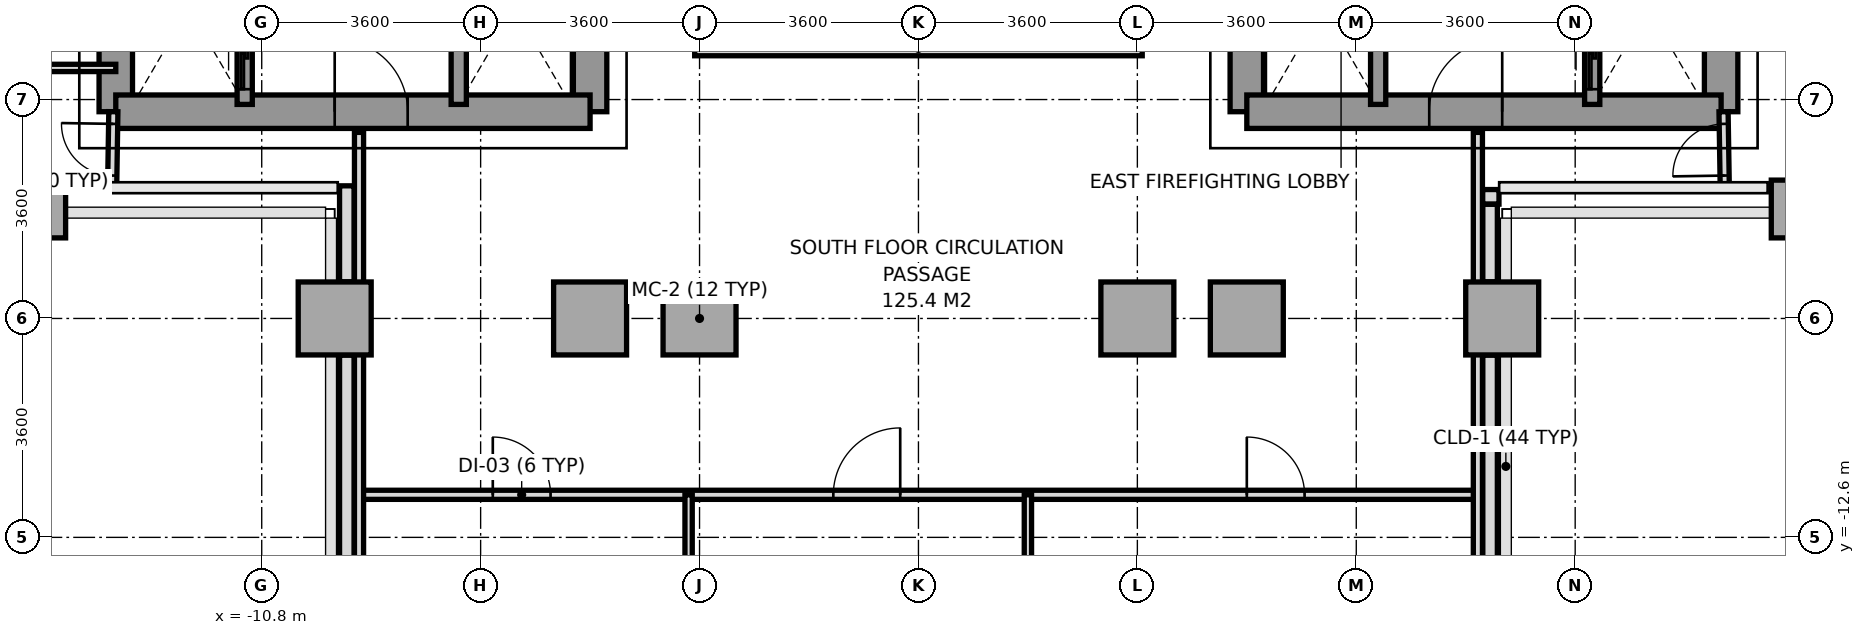
"""IFC4 building model, lengths in metres.
Left out: names, types, materials, properties, quantities, classifications, styles, units other than length and angle.
Written with IfcOpenShell. Run it as: python <this file> out.ifc"""

import sys

from ifc_helpers import new_model, si_unit, direction, frame, frame_2d, origin, origin_2d, place, context, subcontext, project, spatial, rectangle, extrude, source, transform, mapped, element, fill, save


model = new_model("IFC4")
c1 = context("Model", 3, precision=1e-05, world=origin(), true_north=direction((0.0, 1.0)))
c2 = subcontext(c1, "Body", "Model", "MODEL_VIEW")
j1 = project(units=[si_unit("LENGTHUNIT", "METRE"), si_unit("PLANEANGLEUNIT", "RADIAN")], contexts=[c1])
p1 = place(None, origin())
s1 = spatial("IfcSite", under=j1, at=p1, CompositionType="ELEMENT")
p2 = place(p1, origin())
s2 = spatial("IfcBuilding", under=s1, at=p2, CompositionType="ELEMENT")
p3 = place(p2, frame((0.0, 0.0, 51.0)))
s3 = spatial("IfcBuildingStorey", under=s2, at=p3, CompositionType="ELEMENT", Elevation=51.0)
m1 = source(origin(), c2, "Body", "SweptSolid", [
    extrude(rectangle(XDim=0.75, YDim=0.95, at=origin_2d()), origin(), (0.0, 0.0, 1.0), 3.2),
])
p4 = place(p3, frame((-14.4, -7.2, 0.0), z_axis=(0.0, 0.0, 1.0), x_axis=(1.0, 0.0, 0.0)))
e1 = element("IfcColumn", 1, at=p4, inside=s3, PredefinedType="COLUMN", context=c2, shape_type="MappedRepresentation", body=[
    mapped(m1, transform((0.0, 0.0, 0.0), x_axis=(1.0, 0.0, 0.0), y_axis=(0.0, 1.0, 0.0), z_axis=(0.0, 0.0, 1.0), scale=1.0)),
])
m2 = source(origin(), c2, "Body", "SweptSolid", [
    extrude(rectangle(XDim=1.2, YDim=1.2, at=origin_2d()), origin(), (0.0, 0.0, 1.0), 3.2),
])
for number, where, z_axis, x_axis in (
    (2, (-9.6, -9.0, 0.0), (0.0, 0.0, 1.0), (1.0, 0.0, 0.0)),
    (3, (-5.4, -9.0, 0.0), (0.0, 0.0, 1.0), (1.0, 0.0, 0.0)),
    (4, (-3.6, -9.0, 0.0), (0.0, 0.0, 1.0), (1.0, 0.0, 0.0)),
    (5, (3.6, -9.0, 0.0), (0.0, 0.0, 1.0), (1.0, 0.0, 0.0)),
    (6, (5.4, -9.0, 0.0), (0.0, 0.0, 1.0), (1.0, 0.0, 0.0)),
    (7, (9.6, -9.0, 0.0), (0.0, 0.0, 1.0), (1.0, 0.0, 0.0)),
):
    element("IfcColumn", number, at=place(p3, frame(where, z_axis=z_axis, x_axis=x_axis)), inside=s3, PredefinedType="COLUMN", context=c2, shape_type="MappedRepresentation", body=[
        mapped(m2, transform((0.0, 0.0, 0.0), x_axis=(1.0, 0.0, 0.0), y_axis=(0.0, 1.0, 0.0), z_axis=(0.0, 0.0, 1.0), scale=1.0)),
    ])
p5 = place(p3, frame((14.4, -7.2, 0.0), z_axis=(0.0, 0.0, 1.0), x_axis=(1.0, 0.0, 0.0)))
e8 = element("IfcColumn", 8, at=p5, inside=s3, PredefinedType="COLUMN", context=c2, shape_type="MappedRepresentation", body=[
    mapped(m1, transform((0.0, 0.0, 0.0), x_axis=(1.0, 0.0, 0.0), y_axis=(0.0, 1.0, 0.0), z_axis=(0.0, 0.0, 1.0), scale=1.0)),
])
p6 = place(p3, frame((9.547, -7.0, 0.0), z_axis=(0.0, 0.0, 1.0), x_axis=(-1.0, 0.0, 0.0)))
e9 = element("IfcWall", 9, at=p6, inside=s3, PredefinedType="PARAPET", context=c2, shape_type="SweptSolid", body=[
    extrude(rectangle(XDim=0.269, YDim=0.24, at=frame_2d((0.135, 0.0))), origin(), (0.0, 0.0, 1.0), 1.15),
])
p7 = place(p3, frame((9.4, -7.123, 0.0), z_axis=(0.0, 0.0, 1.0), x_axis=(0.0, -1.0, 0.0)))
e10 = element("IfcWall", 10, at=p7, inside=s3, PredefinedType="PARAPET", context=c2, shape_type="SweptSolid", body=[
    extrude(rectangle(XDim=1.274, YDim=0.24, at=frame_2d((0.637, 0.0))), origin(), (0.0, 0.0, 1.0), 1.15),
])
p8 = place(p3, frame((9.4, -9.603, 0.0), z_axis=(0.0, 0.0, 1.0), x_axis=(0.0, -1.0, 0.0)))
e11 = element("IfcWall", 11, at=p8, inside=s3, PredefinedType="PARAPET", context=c2, shape_type="SweptSolid", body=[
    extrude(rectangle(XDim=6.0, YDim=0.24, at=frame_2d((3.0, 0.0))), origin(), (0.0, 0.0, 1.0), 1.15),
])
p9 = place(p3, frame((-9.4, -15.358, 0.0), z_axis=(0.0, 0.0, 1.0), x_axis=(0.0, 1.0, 0.0)))
e12 = element("IfcWall", 12, at=p9, inside=s3, PredefinedType="PARAPET", context=c2, shape_type="SweptSolid", body=[
    extrude(rectangle(XDim=5.755, YDim=0.24, at=frame_2d((2.877, 0.0))), origin(), (0.0, 0.0, 1.0), 1.15),
])
p10 = place(p3, frame((-9.4, -8.397, 0.0), z_axis=(0.0, 0.0, 1.0), x_axis=(0.0, 1.0, 0.0)))
e13 = element("IfcWall", 13, at=p10, inside=s3, PredefinedType="PARAPET", context=c2, shape_type="SweptSolid", body=[
    extrude(rectangle(XDim=1.578, YDim=0.24, at=frame_2d((0.789, 0.0))), origin(), (0.0, 0.0, 1.0), 1.15),
])
p11 = place(p3, frame((-13.2, -5.6, 0.0), z_axis=(0.0, 0.0, 1.0), x_axis=(0.0, 1.0, 0.0)))
e14 = element("IfcWall", 14, at=p11, inside=s3, PredefinedType="SHEAR", context=c2, shape_type="SweptSolid", body=[
    extrude(rectangle(XDim=11.2, YDim=0.55, at=frame_2d((5.6, 0.0))), origin(), (0.0, 0.0, 1.0), 3.2),
])
p12 = place(p3, frame((-5.4, -5.6, 0.0), z_axis=(0.0, 0.0, 1.0), x_axis=(0.0, 1.0, 0.0)))
e15 = element("IfcWall", 15, at=p12, inside=s3, PredefinedType="SHEAR", context=c2, shape_type="SweptSolid", body=[
    extrude(rectangle(XDim=12.5, YDim=0.55, at=frame_2d((6.25, 0.0))), origin(), (0.0, 0.0, 1.0), 3.2),
])
p13 = place(p12, frame((4.55, 0.0, 0.0)))
e16 = element("IfcOpeningElement", 16, at=p13, cuts=e15, PredefinedType="OPENING", context=c2, shape_type="SweptSolid", body=[
    extrude(rectangle(XDim=1.2, YDim=2.2, at=frame_2d((0.6, 1.1))), frame((0.0, 0.285, 0.0), z_axis=(0.0, -1.0, 0.0), x_axis=(1.0, 0.0, 0.0)), (0.0, 0.0, 1.0), 0.57),
])
p14 = place(p12, frame((6.86, 0.0, 0.0)))
e17 = element("IfcOpeningElement", 17, at=p14, cuts=e15, PredefinedType="OPENING", context=c2, shape_type="SweptSolid", body=[
    extrude(rectangle(XDim=0.8, YDim=2.1, at=frame_2d((0.4, 1.05))), frame((0.0, 0.285, 0.0), z_axis=(0.0, -1.0, 0.0), x_axis=(1.0, 0.0, 0.0)), (0.0, 0.0, 1.0), 0.57),
])
p15 = place(p3, frame((-13.2, -5.6, 0.0), z_axis=(0.0, 0.0, 1.0), x_axis=(1.0, 0.0, 0.0)))
e18 = element("IfcWall", 18, at=p15, inside=s3, PredefinedType="SHEAR", context=c2, shape_type="SweptSolid", body=[
    extrude(rectangle(XDim=7.8, YDim=0.55, at=frame_2d((3.9, 0.0))), origin(), (0.0, 0.0, 1.0), 3.2),
])
p16 = place(p15, frame((3.6, 0.0, 0.0)))
e19 = element("IfcOpeningElement", 19, at=p16, cuts=e18, PredefinedType="OPENING", context=c2, shape_type="SweptSolid", body=[
    extrude(rectangle(XDim=1.2, YDim=2.2, at=frame_2d((0.6, 1.1))), frame((0.0, 0.285, 0.0), z_axis=(0.0, -1.0, 0.0), x_axis=(1.0, 0.0, 0.0)), (0.0, 0.0, 1.0), 0.57),
])
p17 = place(p3, frame((13.2, -5.6, 0.0), z_axis=(0.0, 0.0, 1.0), x_axis=(0.0, 1.0, 0.0)))
e20 = element("IfcWall", 20, at=p17, inside=s3, PredefinedType="SHEAR", context=c2, shape_type="SweptSolid", body=[
    extrude(rectangle(XDim=11.2, YDim=0.55, at=frame_2d((5.6, 0.0))), origin(), (0.0, 0.0, 1.0), 3.2),
])
p18 = place(p3, frame((5.4, -5.6, 0.0), z_axis=(0.0, 0.0, 1.0), x_axis=(0.0, 1.0, 0.0)))
e21 = element("IfcWall", 21, at=p18, inside=s3, PredefinedType="SHEAR", context=c2, shape_type="SweptSolid", body=[
    extrude(rectangle(XDim=12.5, YDim=0.55, at=frame_2d((6.25, 0.0))), origin(), (0.0, 0.0, 1.0), 3.2),
])
p19 = place(p18, frame((4.55, 0.0, 0.0)))
e22 = element("IfcOpeningElement", 22, at=p19, cuts=e21, PredefinedType="OPENING", context=c2, shape_type="SweptSolid", body=[
    extrude(rectangle(XDim=1.2, YDim=2.2, at=frame_2d((0.6, 1.1))), frame((0.0, 0.285, 0.0), z_axis=(0.0, -1.0, 0.0), x_axis=(1.0, 0.0, 0.0)), (0.0, 0.0, 1.0), 0.57),
])
p20 = place(p18, frame((6.86, 0.0, 0.0)))
e23 = element("IfcOpeningElement", 23, at=p20, cuts=e21, PredefinedType="OPENING", context=c2, shape_type="SweptSolid", body=[
    extrude(rectangle(XDim=0.8, YDim=2.1, at=frame_2d((0.4, 1.05))), frame((0.0, 0.285, 0.0), z_axis=(0.0, -1.0, 0.0), x_axis=(1.0, 0.0, 0.0)), (0.0, 0.0, 1.0), 0.57),
])
p21 = place(p18, frame((7.88, 0.0, 0.0)))
e24 = element("IfcOpeningElement", 24, at=p21, cuts=e21, PredefinedType="OPENING", context=c2, shape_type="SweptSolid", body=[
    extrude(rectangle(XDim=0.8, YDim=2.1, at=frame_2d((0.4, 1.05))), frame((0.0, 0.285, 0.0), z_axis=(0.0, -1.0, 0.0), x_axis=(1.0, 0.0, 0.0)), (0.0, 0.0, 1.0), 0.57),
])
p22 = place(p3, frame((5.4, -5.6, 0.0), z_axis=(0.0, 0.0, 1.0), x_axis=(1.0, 0.0, 0.0)))
e25 = element("IfcWall", 25, at=p22, inside=s3, PredefinedType="SHEAR", context=c2, shape_type="SweptSolid", body=[
    extrude(rectangle(XDim=7.8, YDim=0.55, at=frame_2d((3.9, 0.0))), origin(), (0.0, 0.0, 1.0), 3.2),
])
p23 = place(p22, frame((3.0, 0.0, 0.0)))
e26 = element("IfcOpeningElement", 26, at=p23, cuts=e25, PredefinedType="OPENING", context=c2, shape_type="SweptSolid", body=[
    extrude(rectangle(XDim=1.2, YDim=2.2, at=frame_2d((0.6, 1.1))), frame((0.0, 0.285, 0.0), z_axis=(0.0, -1.0, 0.0), x_axis=(1.0, 0.0, 0.0)), (0.0, 0.0, 1.0), 0.57),
])
p24 = place(p3, frame((-11.08, -5.48, 0.0), z_axis=(0.0, 0.0, 1.0), x_axis=(0.0, 1.0, 0.0)))
e27 = element("IfcWall", 27, at=p24, inside=s3, PredefinedType="SOLIDWALL", context=c2, shape_type="SweptSolid", body=[
    extrude(rectangle(XDim=1.6, YDim=0.25, at=frame_2d((0.8, 0.0))), origin(), (0.0, 0.0, 1.0), 3.2),
])
p25 = place(p24, frame((0.25, 0.0, 0.0)))
e28 = element("IfcOpeningElement", 28, at=p25, cuts=e27, PredefinedType="OPENING", context=c2, shape_type="SweptSolid", body=[
    extrude(rectangle(XDim=1.1, YDim=2.2, at=frame_2d((0.55, 1.1))), frame((0.0, 0.135, 0.0), z_axis=(0.0, -1.0, 0.0), x_axis=(1.0, 0.0, 0.0)), (0.0, 0.0, 1.0), 0.27),
])
p26 = place(p3, frame((11.08, -5.48, 0.0), z_axis=(0.0, 0.0, 1.0), x_axis=(0.0, 1.0, 0.0)))
e29 = element("IfcWall", 29, at=p26, inside=s3, PredefinedType="SOLIDWALL", context=c2, shape_type="SweptSolid", body=[
    extrude(rectangle(XDim=1.6, YDim=0.25, at=frame_2d((0.8, 0.0))), origin(), (0.0, 0.0, 1.0), 3.2),
])
p27 = place(p26, frame((0.25, 0.0, 0.0)))
e30 = element("IfcOpeningElement", 30, at=p27, cuts=e29, PredefinedType="OPENING", context=c2, shape_type="SweptSolid", body=[
    extrude(rectangle(XDim=1.1, YDim=2.2, at=frame_2d((0.55, 1.1))), frame((0.0, 0.135, 0.0), z_axis=(0.0, -1.0, 0.0), x_axis=(1.0, 0.0, 0.0)), (0.0, 0.0, 1.0), 0.27),
])
for number, where, z_axis, x_axis in (
    (31, (-7.56, -5.48, 0.0), (0.0, 0.0, 1.0), (0.0, 1.0, 0.0)),
    (32, (7.56, -5.48, 0.0), (0.0, 0.0, 1.0), (0.0, 1.0, 0.0)),
):
    element("IfcWall", number, at=place(p3, frame(where, z_axis=z_axis, x_axis=x_axis)), inside=s3, PredefinedType="SOLIDWALL", context=c2, shape_type="SweptSolid", body=[
        extrude(rectangle(XDim=1.6, YDim=0.25, at=frame_2d((0.8, 0.0))), origin(), (0.0, 0.0, 1.0), 3.2),
    ])
p28 = place(p3, frame((-9.2, -11.9, 0.0), z_axis=(0.0, 0.0, 1.0), x_axis=(1.0, 0.0, 0.0)))
e33 = element("IfcWall", 33, at=p28, inside=s3, PredefinedType="PARTITIONING", context=c2, shape_type="SweptSolid", body=[
    extrude(rectangle(XDim=18.4, YDim=0.15, at=frame_2d((9.2, 0.0))), origin(), (0.0, 0.0, 1.0), 3.2),
])
p29 = place(p28, frame((2.2, 0.0, 0.0)))
e34 = element("IfcOpeningElement", 34, at=p29, cuts=e33, PredefinedType="OPENING", context=c2, shape_type="SweptSolid", body=[
    extrude(rectangle(XDim=0.95, YDim=2.15, at=frame_2d((0.475, 1.075))), frame((0.0, 0.085, 0.0), z_axis=(0.0, -1.0, 0.0), x_axis=(1.0, 0.0, 0.0)), (0.0, 0.0, 1.0), 0.17),
])
p30 = place(p28, frame((7.8, 0.0, 0.0)))
e35 = element("IfcOpeningElement", 35, at=p30, cuts=e33, PredefinedType="OPENING", context=c2, shape_type="SweptSolid", body=[
    extrude(rectangle(XDim=1.1, YDim=2.2, at=frame_2d((0.55, 1.1))), frame((0.0, 0.085, 0.0), z_axis=(0.0, -1.0, 0.0), x_axis=(1.0, 0.0, 0.0)), (0.0, 0.0, 1.0), 0.17),
])
p31 = place(p28, frame((14.6, 0.0, 0.0)))
e36 = element("IfcOpeningElement", 36, at=p31, cuts=e33, PredefinedType="OPENING", context=c2, shape_type="SweptSolid", body=[
    extrude(rectangle(XDim=0.95, YDim=2.15, at=frame_2d((0.475, 1.075))), frame((0.0, 0.085, 0.0), z_axis=(0.0, -1.0, 0.0), x_axis=(1.0, 0.0, 0.0)), (0.0, 0.0, 1.0), 0.17),
])
for number, where, z_axis, x_axis in (
    (37, (-9.2, -15.68, 0.0), (0.0, 0.0, 1.0), (0.0, 1.0, 0.0)),
    (38, (9.2, -15.68, 0.0), (0.0, 0.0, 1.0), (0.0, 1.0, 0.0)),
):
    element("IfcWall", number, at=place(p3, frame(where, z_axis=z_axis, x_axis=x_axis)), inside=s3, PredefinedType="PARTITIONING", context=c2, shape_type="SweptSolid", body=[
        extrude(rectangle(XDim=9.74, YDim=0.15, at=frame_2d((4.87, 0.0))), origin(), (0.0, 0.0, 1.0), 2.65),
    ])
for number, where, z_axis, x_axis in (
    (39, (-3.78, -24.65, 0.0), (0.0, 0.0, 1.0), (0.0, 1.0, 0.0)),
    (40, (1.8, -24.65, 0.0), (0.0, 0.0, 1.0), (0.0, 1.0, 0.0)),
):
    element("IfcWall", number, at=place(p3, frame(where, z_axis=z_axis, x_axis=x_axis)), inside=s3, PredefinedType="PARTITIONING", context=c2, shape_type="SweptSolid", body=[
        extrude(rectangle(XDim=12.75, YDim=0.12, at=frame_2d((6.375, 0.0))), origin(), (0.0, 0.0, 1.0), 2.65),
    ])
p32 = place(p3, frame((-13.26, -6.85, 0.0), z_axis=(0.0, 0.0, 1.0), x_axis=(0.016013571389, 0.999871774545, 0.0)))
e41 = element("IfcWall", 41, at=p32, inside=s3, PredefinedType="PARTITIONING", context=c2, shape_type="SweptSolid", body=[
    extrude(rectangle(XDim=1.25, YDim=0.15, at=frame_2d((0.625, 0.0))), origin(), (0.0, 0.0, 1.0), 3.2),
])
p33 = place(p32, frame((0.2, 0.0, 0.0)))
e42 = element("IfcOpeningElement", 42, at=p33, cuts=e41, PredefinedType="OPENING", context=c2, shape_type="SweptSolid", body=[
    extrude(rectangle(XDim=0.85, YDim=2.1, at=frame_2d((0.425, 1.05))), frame((0.0, 0.085, 0.0), z_axis=(0.0, -1.0, 0.0), x_axis=(1.0, 0.0, 0.0)), (0.0, 0.0, 1.0), 0.17),
])
p34 = place(p3, frame((-24.57, -4.88, 0.0), z_axis=(0.0, 0.0, 1.0), x_axis=(1.0, 0.0, 0.0)))
e43 = element("IfcWall", 43, at=p34, inside=s3, PredefinedType="PARTITIONING", context=c2, shape_type="SweptSolid", body=[
    extrude(rectangle(XDim=11.37, YDim=0.12, at=frame_2d((5.685, 0.0))), origin(), (0.0, 0.0, 1.0), 2.7),
])
p35 = place(p34, frame((2.2, 0.0, 0.0)))
e44 = element("IfcOpeningElement", 44, at=p35, cuts=e43, PredefinedType="OPENING", context=c2, shape_type="SweptSolid", body=[
    extrude(rectangle(XDim=0.95, YDim=2.15, at=frame_2d((0.475, 1.075))), frame((0.0, 0.07, 0.0), z_axis=(0.0, -1.0, 0.0), x_axis=(1.0, 0.0, 0.0)), (0.0, 0.0, 1.0), 0.14),
])
p36 = place(p3, frame((13.26, -6.85, 0.0), z_axis=(0.0, 0.0, 1.0), x_axis=(-0.016013571389, 0.999871774545, 0.0)))
e45 = element("IfcWall", 45, at=p36, inside=s3, PredefinedType="PARTITIONING", context=c2, shape_type="SweptSolid", body=[
    extrude(rectangle(XDim=1.25, YDim=0.15, at=frame_2d((0.625, 0.0))), origin(), (0.0, 0.0, 1.0), 3.2),
])
p37 = place(p36, frame((0.2, 0.0, 0.0)))
e46 = element("IfcOpeningElement", 46, at=p37, cuts=e45, PredefinedType="OPENING", context=c2, shape_type="SweptSolid", body=[
    extrude(rectangle(XDim=0.85, YDim=2.1, at=frame_2d((0.425, 1.05))), frame((0.0, 0.085, 0.0), z_axis=(0.0, -1.0, 0.0), x_axis=(1.0, 0.0, 0.0)), (0.0, 0.0, 1.0), 0.17),
])
p38 = place(p3, frame((-3.68, -4.56, 0.0), z_axis=(0.0, 0.0, 1.0), x_axis=(1.0, 0.0, 0.0)))
e47 = element("IfcWall", 47, at=p38, inside=s3, PredefinedType="PARAPET", context=c2, shape_type="SweptSolid", body=[
    extrude(rectangle(XDim=7.36, YDim=0.24, at=frame_2d((3.68, 0.0))), origin(), (0.0, 0.0, 1.0), 1.15),
])
m3 = source(origin(), c2, "Body", "SweptSolid", [
    extrude(rectangle(XDim=1.2, YDim=2.2, at=frame_2d((0.6, 1.1))), frame((0.0, 0.025, 0.0), z_axis=(0.0, -1.0, 0.0), x_axis=(1.0, 0.0, 0.0)), (0.0, 0.0, 1.0), 0.05),
])
p39 = place(p16, origin())
e48 = element("IfcDoor", 48, at=p39, inside=s3, OperationType="SINGLE_SWING_LEFT", PredefinedType="DOOR", context=c2, shape_type="MappedRepresentation", body=[
    mapped(m3, transform((0.0, 0.0, 0.0), x_axis=(1.0, 0.0, 0.0), y_axis=(0.0, 1.0, 0.0), z_axis=(0.0, 0.0, 1.0), scale=1.0)),
])
fill(e19, e48)
p40 = place(p23, origin())
e49 = element("IfcDoor", 49, at=p40, inside=s3, OperationType="SINGLE_SWING_RIGHT", PredefinedType="DOOR", context=c2, shape_type="MappedRepresentation", body=[
    mapped(m3, transform((0.0, 0.0, 0.0), x_axis=(1.0, 0.0, 0.0), y_axis=(0.0, 1.0, 0.0), z_axis=(0.0, 0.0, 1.0), scale=1.0)),
])
fill(e26, e49)
m4 = source(origin(), c2, "Body", "SweptSolid", [
    extrude(rectangle(XDim=1.1, YDim=2.2, at=frame_2d((0.55, 1.1))), frame((0.0, 0.025, 0.0), z_axis=(0.0, -1.0, 0.0), x_axis=(1.0, 0.0, 0.0)), (0.0, 0.0, 1.0), 0.05),
])
p41 = place(p25, origin())
e50 = element("IfcDoor", 50, at=p41, inside=s3, OperationType="SLIDING_TO_LEFT", PredefinedType="DOOR", context=c2, shape_type="MappedRepresentation", body=[
    mapped(m4, transform((0.0, 0.0, 0.0), x_axis=(1.0, 0.0, 0.0), y_axis=(0.0, 1.0, 0.0), z_axis=(0.0, 0.0, 1.0), scale=1.0)),
])
fill(e28, e50)
p42 = place(p27, origin())
e51 = element("IfcDoor", 51, at=p42, inside=s3, OperationType="SLIDING_TO_LEFT", PredefinedType="DOOR", context=c2, shape_type="MappedRepresentation", body=[
    mapped(m4, transform((0.0, 0.0, 0.0), x_axis=(1.0, 0.0, 0.0), y_axis=(0.0, 1.0, 0.0), z_axis=(0.0, 0.0, 1.0), scale=1.0)),
])
fill(e30, e51)
m5 = source(origin(), c2, "Body", "SweptSolid", [
    extrude(rectangle(XDim=0.95, YDim=2.15, at=frame_2d((0.475, 1.075))), frame((0.0, 0.025, 0.0), z_axis=(0.0, -1.0, 0.0), x_axis=(1.0, 0.0, 0.0)), (0.0, 0.0, 1.0), 0.05),
])
p43 = place(p29, origin())
e52 = element("IfcDoor", 52, at=p43, inside=s3, OperationType="SINGLE_SWING_LEFT", PredefinedType="DOOR", context=c2, shape_type="MappedRepresentation", body=[
    mapped(m5, transform((0.0, 0.0, 0.0), x_axis=(1.0, 0.0, 0.0), y_axis=(0.0, 1.0, 0.0), z_axis=(0.0, 0.0, 1.0), scale=1.0)),
])
fill(e34, e52)
p44 = place(p30, origin())
e53 = element("IfcDoor", 53, at=p44, inside=s3, OperationType="SINGLE_SWING_RIGHT", PredefinedType="DOOR", context=c2, shape_type="MappedRepresentation", body=[
    mapped(m4, transform((0.0, 0.0, 0.0), x_axis=(1.0, 0.0, 0.0), y_axis=(0.0, 1.0, 0.0), z_axis=(0.0, 0.0, 1.0), scale=1.0)),
])
fill(e35, e53)
p45 = place(p31, origin())
e54 = element("IfcDoor", 54, at=p45, inside=s3, OperationType="SINGLE_SWING_LEFT", PredefinedType="DOOR", context=c2, shape_type="MappedRepresentation", body=[
    mapped(m5, transform((0.0, 0.0, 0.0), x_axis=(1.0, 0.0, 0.0), y_axis=(0.0, 1.0, 0.0), z_axis=(0.0, 0.0, 1.0), scale=1.0)),
])
fill(e36, e54)
m6 = source(origin(), c2, "Body", "SweptSolid", [
    extrude(rectangle(XDim=0.85, YDim=2.1, at=frame_2d((0.425, 1.05))), frame((0.0, 0.025, 0.0), z_axis=(0.0, -1.0, 0.0), x_axis=(1.0, 0.0, 0.0)), (0.0, 0.0, 1.0), 0.05),
])
p46 = place(p33, origin())
e55 = element("IfcDoor", 55, at=p46, inside=s3, OperationType="SINGLE_SWING_RIGHT", PredefinedType="DOOR", context=c2, shape_type="MappedRepresentation", body=[
    mapped(m6, transform((0.0, 0.0, 0.0), x_axis=(1.0, 0.0, 0.0), y_axis=(0.0, 1.0, 0.0), z_axis=(0.0, 0.0, 1.0), scale=1.0)),
])
fill(e42, e55)
p47 = place(p37, origin())
e56 = element("IfcDoor", 56, at=p47, inside=s3, OperationType="SINGLE_SWING_LEFT", PredefinedType="DOOR", context=c2, shape_type="MappedRepresentation", body=[
    mapped(m6, transform((0.0, 0.0, 0.0), x_axis=(1.0, 0.0, 0.0), y_axis=(0.0, 1.0, 0.0), z_axis=(0.0, 0.0, 1.0), scale=1.0)),
])
fill(e46, e56)
save(model, sys.argv[1])
